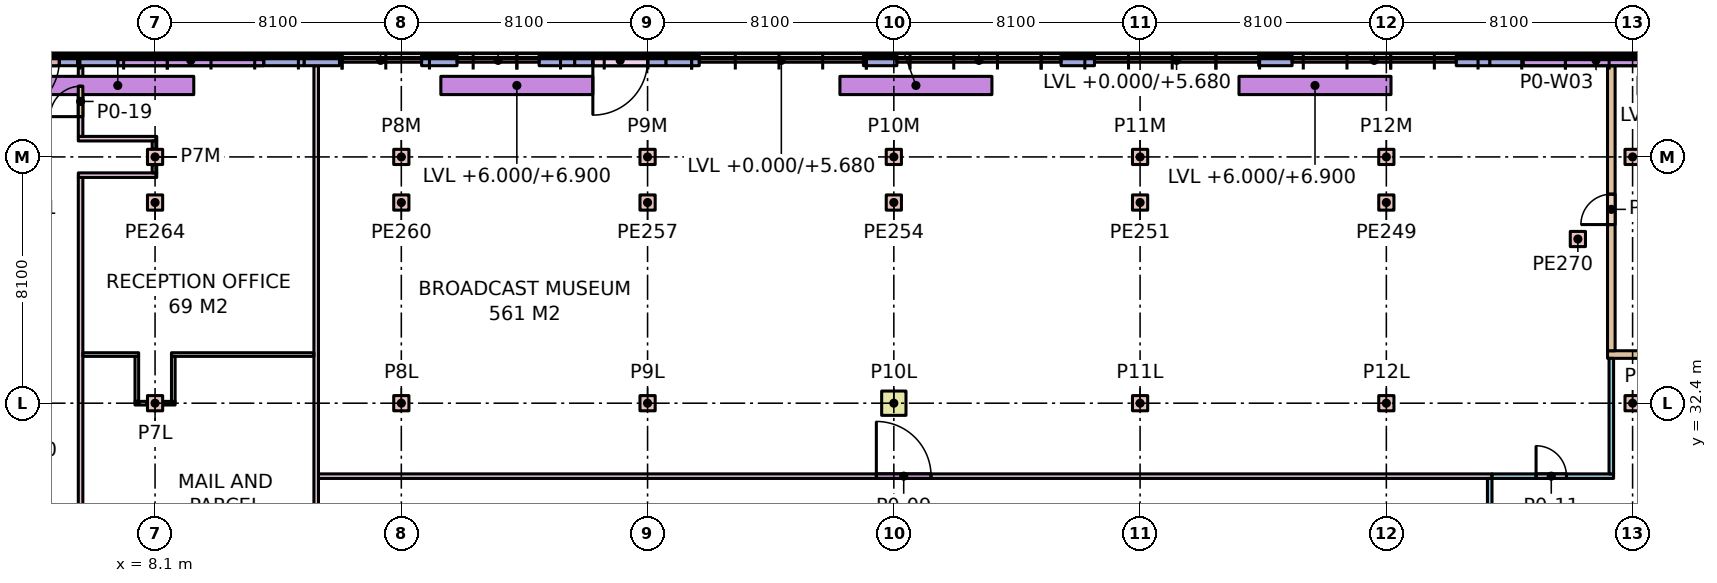
"""IFC4 building model, lengths in metres.
Left out: names, types, materials, properties, quantities, classifications, styles, units other than length and angle.
Written with IfcOpenShell. Run it as: python <this file> out.ifc"""

import sys

from ifc_helpers import new_model, si_unit, direction, frame, frame_2d, origin, origin_2d, place, context, subcontext, project, spatial, rectangle, extrude, element, fill, save


model = new_model("IFC4")
c1 = context("Model", 3, precision=1e-05, world=origin(), true_north=direction((0.0, 1.0)))
c2 = subcontext(c1, "Body", "Model", "MODEL_VIEW")
j1 = project(units=[si_unit("LENGTHUNIT", "METRE"), si_unit("PLANEANGLEUNIT", "RADIAN")], contexts=[c1])
p1 = place(None, origin())
s1 = spatial("IfcSite", under=j1, at=p1, CompositionType="ELEMENT")
p2 = place(p1, origin())
s2 = spatial("IfcBuilding", under=s1, at=p2, CompositionType="ELEMENT")
p3 = place(p2, origin())
s3 = spatial("IfcBuildingStorey", under=s2, at=p3, CompositionType="ELEMENT", Elevation=0.0)
for number, where, z_axis, x_axis in (
    (1, (8.1, 32.4, 0.0), (0.0, 0.0, 1.0), (1.0, 0.0, 0.0)),
    (2, (8.1, 40.5, 0.0), (0.0, 0.0, 1.0), (1.0, 0.0, 0.0)),
    (3, (16.2, 32.4, 0.0), (0.0, 0.0, 1.0), (1.0, 0.0, 0.0)),
    (4, (16.2, 40.5, 0.0), (0.0, 0.0, 1.0), (1.0, 0.0, 0.0)),
    (5, (24.3, 32.4, 0.0), (0.0, 0.0, 1.0), (1.0, 0.0, 0.0)),
    (6, (24.3, 40.5, 0.0), (0.0, 0.0, 1.0), (1.0, 0.0, 0.0)),
):
    element("IfcColumn", number, at=place(p3, frame(where, z_axis=z_axis, x_axis=x_axis)), inside=s3, PredefinedType="COLUMN", context=c2, shape_type="SweptSolid", body=[
        extrude(rectangle(XDim=0.5, YDim=0.5, at=origin_2d()), origin(), (0.0, 0.0, 1.0), 6.0),
    ])
p4 = place(p3, frame((32.4, 32.4, 0.0), z_axis=(0.0, 0.0, 1.0), x_axis=(1.0, 0.0, 0.0)))
e7 = element("IfcColumn", 7, at=p4, inside=s3, PredefinedType="COLUMN", context=c2, shape_type="SweptSolid", body=[
    extrude(rectangle(XDim=0.8, YDim=0.8, at=origin_2d()), origin(), (0.0, 0.0, 1.0), 6.0),
])
for number, where, z_axis, x_axis in (
    (8, (32.4, 40.5, 0.0), (0.0, 0.0, 1.0), (1.0, 0.0, 0.0)),
    (9, (40.5, 32.4, 0.0), (0.0, 0.0, 1.0), (1.0, 0.0, 0.0)),
    (10, (40.5, 40.5, 0.0), (0.0, 0.0, 1.0), (1.0, 0.0, 0.0)),
    (11, (48.6, 32.4, 0.0), (0.0, 0.0, 1.0), (1.0, 0.0, 0.0)),
    (12, (48.6, 40.5, 0.0), (0.0, 0.0, 1.0), (1.0, 0.0, 0.0)),
    (13, (56.7, 32.4, 0.0), (0.0, 0.0, 1.0), (1.0, 0.0, 0.0)),
    (14, (56.7, 40.5, 0.0), (0.0, 0.0, 1.0), (1.0, 0.0, 0.0)),
    (15, (48.6, 39.0, 0.0), (0.0, 0.0, 1.0), (1.0, 0.0, 0.0)),
    (16, (40.5, 39.0, 0.0), (0.0, 0.0, 1.0), (1.0, 0.0, 0.0)),
    (17, (32.4, 39.0, 0.0), (0.0, 0.0, 1.0), (1.0, 0.0, 0.0)),
    (18, (24.3, 39.0, 0.0), (0.0, 0.0, 1.0), (1.0, 0.0, 0.0)),
    (19, (16.2, 39.0, 0.0), (0.0, 0.0, 1.0), (1.0, 0.0, 0.0)),
    (20, (8.1, 39.0, 0.0), (0.0, 0.0, 1.0), (1.0, 0.0, 0.0)),
    (21, (54.9, 37.8, 0.0), (0.0, 0.0, 1.0), (1.0, 0.0, 0.0)),
):
    element("IfcColumn", number, at=place(p3, frame(where, z_axis=z_axis, x_axis=x_axis)), inside=s3, PredefinedType="COLUMN", context=c2, shape_type="SweptSolid", body=[
        extrude(rectangle(XDim=0.5, YDim=0.5, at=origin_2d()), origin(), (0.0, 0.0, 1.0), 6.0),
    ])
p5 = place(p3, frame((58.992, 43.675, 0.0), z_axis=(0.0, 0.0, 1.0), x_axis=(-1.0, 0.0, 0.0)))
e22 = element("IfcWall", 22, at=p5, inside=s3, PredefinedType="STANDARD", context=c2, shape_type="SweptSolid", body=[
    extrude(rectangle(XDim=6.992, YDim=0.35, at=frame_2d((3.496, 0.0))), origin(), (0.0, 0.0, 1.0), 5.68),
])
p6 = place(p5, frame((1.096, 0.0, 0.3)))
e23 = element("IfcOpeningElement", 23, at=p6, cuts=e22, PredefinedType="OPENING", context=c2, shape_type="SweptSolid", body=[
    extrude(rectangle(XDim=4.8, YDim=4.5, at=frame_2d((2.4, 2.25))), frame((0.0, 0.185, 0.0), z_axis=(0.0, -1.0, 0.0), x_axis=(1.0, 0.0, 0.0)), (0.0, 0.0, 1.0), 0.37),
])
for number, where, z_axis, x_axis in (
    (24, (52.0, 43.675, 0.0), (0.0, 0.0, 1.0), (-1.0, 0.0, 0.0)),
    (25, (45.5, 43.675, 0.0), (0.0, 0.0, 1.0), (-1.0, 0.0, 0.0)),
    (26, (39.0, 43.675, 0.0), (0.0, 0.0, 1.0), (-1.0, 0.0, 0.0)),
    (27, (32.5, 43.675, 0.0), (0.0, 0.0, 1.0), (-1.0, 0.0, 0.0)),
    (28, (26.0, 43.675, 0.0), (0.0, 0.0, 1.0), (-1.0, 0.0, 0.0)),
):
    element("IfcWall", number, at=place(p3, frame(where, z_axis=z_axis, x_axis=x_axis)), inside=s3, PredefinedType="STANDARD", context=c2, shape_type="SweptSolid", body=[
        extrude(rectangle(XDim=1.1, YDim=0.35, at=frame_2d((0.55, 0.0))), origin(), (0.0, 0.0, 1.0), 5.68),
    ])
p7 = place(p3, frame((24.9, 43.675, 0.0), z_axis=(0.0, 0.0, 1.0), x_axis=(-1.0, 0.0, 0.0)))
e29 = element("IfcWall", 29, at=p7, inside=s3, PredefinedType="STANDARD", context=c2, shape_type="SweptSolid", body=[
    extrude(rectangle(XDim=3.0, YDim=0.35, at=frame_2d((1.5, 0.0))), origin(), (0.0, 0.0, 1.0), 5.68),
])
p8 = place(p7, frame((0.6, 0.0, 0.0)))
e30 = element("IfcOpeningElement", 30, at=p8, cuts=e29, PredefinedType="OPENING", context=c2, shape_type="SweptSolid", body=[
    extrude(rectangle(XDim=1.8, YDim=2.7, at=frame_2d((0.9, 1.35))), frame((0.0, 0.185, 0.0), z_axis=(0.0, -1.0, 0.0), x_axis=(1.0, 0.0, 0.0)), (0.0, 0.0, 1.0), 0.37),
])
for number, where, z_axis, x_axis in (
    (31, (21.9, 43.675, 0.0), (0.0, 0.0, 1.0), (-1.0, 0.0, 0.0)),
    (32, (18.033, 43.675, 0.0), (0.0, 0.0, 1.0), (-1.0, 0.0, 0.0)),
):
    element("IfcWall", number, at=place(p3, frame(where, z_axis=z_axis, x_axis=x_axis)), inside=s3, PredefinedType="STANDARD", context=c2, shape_type="SweptSolid", body=[
        extrude(rectangle(XDim=1.167, YDim=0.35, at=frame_2d((0.583, 0.0))), origin(), (0.0, 0.0, 1.0), 5.68),
    ])
p9 = place(p3, frame((14.167, 43.675, 0.0), z_axis=(0.0, 0.0, 1.0), x_axis=(-1.0, 0.0, 0.0)))
e33 = element("IfcWall", 33, at=p9, inside=s3, PredefinedType="STANDARD", context=c2, shape_type="SweptSolid", body=[
    extrude(rectangle(XDim=1.167, YDim=0.35, at=frame_2d((0.583, 0.0))), origin(), (0.0, 0.0, 1.0), 5.68),
])
p10 = place(p3, frame((13.0, 43.675, 0.0), z_axis=(0.0, 0.0, 1.0), x_axis=(-1.0, 0.0, 0.0)))
e34 = element("IfcWall", 34, at=p10, inside=s3, PredefinedType="STANDARD", context=c2, shape_type="SweptSolid", body=[
    extrude(rectangle(XDim=7.45, YDim=0.35, at=frame_2d((3.725, 0.0))), origin(), (0.0, 0.0, 1.0), 5.68),
])
p11 = place(p10, frame((1.325, 0.0, 0.3)))
e35 = element("IfcOpeningElement", 35, at=p11, cuts=e34, PredefinedType="OPENING", context=c2, shape_type="SweptSolid", body=[
    extrude(rectangle(XDim=4.8, YDim=4.5, at=frame_2d((2.4, 2.25))), frame((0.0, 0.185, 0.0), z_axis=(0.0, -1.0, 0.0), x_axis=(1.0, 0.0, 0.0)), (0.0, 0.0, 1.0), 0.37),
])
p12 = place(p3, frame((5.55, 43.675, 0.0), z_axis=(0.0, 0.0, 1.0), x_axis=(-1.0, 0.0, 0.0)))
e36 = element("IfcWall", 36, at=p12, inside=s3, PredefinedType="STANDARD", context=c2, shape_type="SweptSolid", body=[
    extrude(rectangle(XDim=3.0, YDim=0.35, at=frame_2d((1.5, 0.0))), origin(), (0.0, 0.0, 1.0), 5.68),
])
p13 = place(p12, frame((0.6, 0.0, 0.0)))
e37 = element("IfcOpeningElement", 37, at=p13, cuts=e36, PredefinedType="OPENING", context=c2, shape_type="SweptSolid", body=[
    extrude(rectangle(XDim=1.8, YDim=2.4, at=frame_2d((0.9, 1.2))), frame((0.0, 0.185, 0.0), z_axis=(0.0, -1.0, 0.0), x_axis=(1.0, 0.0, 0.0)), (0.0, 0.0, 1.0), 0.37),
])
for number, where, z_axis, x_axis in (
    (38, (48.753, 42.85, 6.0), (0.0, 0.0, 1.0), (-1.0, 0.0, 0.0)),
    (39, (35.627, 42.85, 6.0), (0.0, 0.0, 1.0), (-1.0, 0.0, 0.0)),
    (40, (22.5, 42.85, 6.0), (0.0, 0.0, 1.0), (-1.0, 0.0, 0.0)),
    (41, (9.373, 42.85, 6.0), (0.0, 0.0, 1.0), (-1.0, 0.0, 0.0)),
):
    element("IfcWall", number, at=place(p3, frame(where, z_axis=z_axis, x_axis=x_axis)), inside=s3, PredefinedType="PARAPET", context=c2, shape_type="SweptSolid", body=[
        extrude(rectangle(XDim=5.0, YDim=0.6, at=frame_2d((2.5, 0.0))), origin(), (0.0, 0.0, 1.0), 0.9),
    ])
p14 = place(p3, frame((55.875, 34.0, 0.0), z_axis=(0.0, 0.0, 1.0), x_axis=(1.0, 0.0, 0.0)))
e42 = element("IfcWall", 42, at=p14, inside=s3, PredefinedType="PARTITIONING", context=c2, shape_type="SweptSolid", body=[
    extrude(rectangle(XDim=18.15, YDim=0.25, at=frame_2d((9.075, 0.0))), origin(), (0.0, 0.0, 1.0), 5.68),
])
p15 = place(p3, frame((52.0, 24.075, 0.0), z_axis=(0.0, 0.0, 1.0), x_axis=(0.0, 1.0, 0.0)))
e43 = element("IfcWall", 43, at=p15, inside=s3, PredefinedType="PARTITIONING", context=c2, shape_type="SweptSolid", body=[
    extrude(rectangle(XDim=5.85, YDim=0.15, at=frame_2d((2.925, 0.0))), origin(), (0.0, 0.0, 1.0), 5.68),
])
p16 = place(p3, frame((52.075, 30.0, 0.0), z_axis=(0.0, 0.0, 1.0), x_axis=(1.0, 0.0, 0.0)))
e44 = element("IfcWall", 44, at=p16, inside=s3, PredefinedType="PARTITIONING", context=c2, shape_type="SweptSolid", body=[
    extrude(rectangle(XDim=4.0, YDim=0.15, at=frame_2d((2.0, 0.0))), origin(), (0.0, 0.0, 1.0), 5.68),
])
p17 = place(p16, frame((1.45, 0.0, 0.0)))
e45 = element("IfcOpeningElement", 45, at=p17, cuts=e44, PredefinedType="OPENING", context=c2, shape_type="SweptSolid", body=[
    extrude(rectangle(XDim=1.0, YDim=2.1, at=frame_2d((0.5, 1.05))), frame((0.0, 0.085, 0.0), z_axis=(0.0, -1.0, 0.0), x_axis=(1.0, 0.0, 0.0)), (0.0, 0.0, 1.0), 0.17),
])
p18 = place(p3, frame((56.0, 30.075, 0.0), z_axis=(0.0, 0.0, 1.0), x_axis=(0.0, 1.0, 0.0)))
e46 = element("IfcWall", 46, at=p18, inside=s3, PredefinedType="PARTITIONING", context=c2, shape_type="SweptSolid", body=[
    extrude(rectangle(XDim=3.8, YDim=0.15, at=frame_2d((1.9, 0.0))), origin(), (0.0, 0.0, 1.0), 5.68),
])
p19 = place(p3, frame((56.0, 34.125, 0.0), z_axis=(0.0, 0.0, 1.0), x_axis=(0.0, 1.0, 0.0)))
e47 = element("IfcWall", 47, at=p19, inside=s3, PredefinedType="PARTITIONING", context=c2, shape_type="SweptSolid", body=[
    extrude(rectangle(XDim=9.375, YDim=0.25, at=frame_2d((4.688, 0.0))), origin(), (0.0, 0.0, 1.0), 5.68),
])
p20 = place(p19, frame((4.15, 0.0, 0.0)))
e48 = element("IfcOpeningElement", 48, at=p20, cuts=e47, PredefinedType="OPENING", context=c2, shape_type="SweptSolid", body=[
    extrude(rectangle(XDim=1.0, YDim=2.1, at=frame_2d((0.5, 1.05))), frame((0.0, 0.135, 0.0), z_axis=(0.0, -1.0, 0.0), x_axis=(1.0, 0.0, 0.0)), (0.0, 0.0, 1.0), 0.27),
])
p21 = place(p3, frame((13.475, 30.0, 0.0), z_axis=(0.0, 0.0, 1.0), x_axis=(1.0, 0.0, 0.0)))
e49 = element("IfcWall", 49, at=p21, inside=s3, PredefinedType="PARTITIONING", context=c2, shape_type="SweptSolid", body=[
    extrude(rectangle(XDim=38.6, YDim=0.15, at=frame_2d((19.3, 0.0))), origin(), (0.0, 0.0, 1.0), 5.68),
])
p22 = place(p21, frame((18.35, 0.0, 0.0)))
e50 = element("IfcOpeningElement", 50, at=p22, cuts=e49, PredefinedType="OPENING", context=c2, shape_type="SweptSolid", body=[
    extrude(rectangle(XDim=1.8, YDim=2.4, at=frame_2d((0.9, 1.2))), frame((0.0, 0.085, 0.0), z_axis=(0.0, -1.0, 0.0), x_axis=(1.0, 0.0, 0.0)), (0.0, 0.0, 1.0), 0.17),
])
p23 = place(p3, frame((13.4, 11.475, 0.0), z_axis=(0.0, 0.0, 1.0), x_axis=(0.0, 1.0, 0.0)))
e51 = element("IfcWall", 51, at=p23, inside=s3, PredefinedType="PARTITIONING", context=c2, shape_type="SweptSolid", body=[
    extrude(rectangle(XDim=32.025, YDim=0.15, at=frame_2d((16.012, 0.0))), origin(), (0.0, 0.0, 1.0), 5.68),
])
p24 = place(p3, frame((7.44, 32.4, 0.0), z_axis=(0.0, 0.0, 1.0), x_axis=(1.0, 0.0, 0.0)))
e52 = element("IfcWall", 52, at=p24, inside=s3, PredefinedType="PARTITIONING", context=c2, shape_type="SweptSolid", body=[
    extrude(rectangle(XDim=0.4, YDim=0.12, at=frame_2d((0.2, 0.0))), origin(), (0.0, 0.0, 1.0), 5.68),
])
p25 = place(p3, frame((8.36, 32.4, 0.0), z_axis=(0.0, 0.0, 1.0), x_axis=(1.0, 0.0, 0.0)))
e53 = element("IfcWall", 53, at=p25, inside=s3, PredefinedType="PARTITIONING", context=c2, shape_type="SweptSolid", body=[
    extrude(rectangle(XDim=0.4, YDim=0.12, at=frame_2d((0.2, 0.0))), origin(), (0.0, 0.0, 1.0), 5.68),
])
p26 = place(p3, frame((5.725, 34.0, 0.0), z_axis=(0.0, 0.0, 1.0), x_axis=(1.0, 0.0, 0.0)))
e54 = element("IfcWall", 54, at=p26, inside=s3, PredefinedType="PARTITIONING", context=c2, shape_type="SweptSolid", body=[
    extrude(rectangle(XDim=1.835, YDim=0.12, at=frame_2d((0.917, 0.0))), origin(), (0.0, 0.0, 1.0), 5.68),
])
p27 = place(p3, frame((8.64, 34.0, 0.0), z_axis=(0.0, 0.0, 1.0), x_axis=(1.0, 0.0, 0.0)))
e55 = element("IfcWall", 55, at=p27, inside=s3, PredefinedType="PARTITIONING", context=c2, shape_type="SweptSolid", body=[
    extrude(rectangle(XDim=4.685, YDim=0.12, at=frame_2d((2.343, 0.0))), origin(), (0.0, 0.0, 1.0), 5.68),
])
for number, where, z_axis, x_axis in (
    (56, (7.5, 32.46, 0.0), (0.0, 0.0, 1.0), (0.0, 1.0, 0.0)),
    (57, (8.7, 32.46, 0.0), (0.0, 0.0, 1.0), (0.0, 1.0, 0.0)),
):
    element("IfcWall", number, at=place(p3, frame(where, z_axis=z_axis, x_axis=x_axis)), inside=s3, PredefinedType="PARTITIONING", context=c2, shape_type="SweptSolid", body=[
        extrude(rectangle(XDim=1.48, YDim=0.12, at=frame_2d((0.74, 0.0))), origin(), (0.0, 0.0, 1.0), 5.68),
    ])
for number, where, z_axis, x_axis in (
    (58, (5.575, 39.9, 0.0), (0.0, 0.0, 1.0), (1.0, 0.0, 0.0)),
    (59, (5.575, 41.1, 0.0), (0.0, 0.0, 1.0), (1.0, 0.0, 0.0)),
):
    element("IfcWall", number, at=place(p3, frame(where, z_axis=z_axis, x_axis=x_axis)), inside=s3, PredefinedType="PARTITIONING", context=c2, shape_type="SweptSolid", body=[
        extrude(rectangle(XDim=2.58, YDim=0.15, at=frame_2d((1.29, 0.0))), origin(), (0.0, 0.0, 1.0), 5.68),
    ])
p28 = place(p3, frame((5.65, 41.175, 0.0), z_axis=(0.0, 0.0, 1.0), x_axis=(0.0, 1.0, 0.0)))
e60 = element("IfcWall", 60, at=p28, inside=s3, PredefinedType="PARTITIONING", context=c2, shape_type="SweptSolid", body=[
    extrude(rectangle(XDim=2.325, YDim=0.15, at=frame_2d((1.163, 0.0))), origin(), (0.0, 0.0, 1.0), 5.68),
])
p29 = place(p28, frame((0.65, 0.0, 0.0)))
e61 = element("IfcOpeningElement", 61, at=p29, cuts=e60, PredefinedType="OPENING", context=c2, shape_type="SweptSolid", body=[
    extrude(rectangle(XDim=1.0, YDim=2.1, at=frame_2d((0.5, 1.05))), frame((0.0, 0.085, 0.0), z_axis=(0.0, -1.0, 0.0), x_axis=(1.0, 0.0, 0.0)), (0.0, 0.0, 1.0), 0.17),
])
for number, where, z_axis, x_axis in (
    (62, (8.08, 39.975, 0.0), (0.0, 0.0, 1.0), (0.0, 1.0, 0.0)),
    (63, (8.08, 40.76, 0.0), (0.0, 0.0, 1.0), (0.0, 1.0, 0.0)),
):
    element("IfcWall", number, at=place(p3, frame(where, z_axis=z_axis, x_axis=x_axis)), inside=s3, PredefinedType="PARTITIONING", context=c2, shape_type="SweptSolid", body=[
        extrude(rectangle(XDim=0.265, YDim=0.15, at=frame_2d((0.132, 0.0))), origin(), (0.0, 0.0, 1.0), 5.68),
    ])
p30 = place(p3, frame((5.65, 21.125, 0.0), z_axis=(0.0, 0.0, 1.0), x_axis=(0.0, 1.0, 0.0)))
e64 = element("IfcWall", 64, at=p30, inside=s3, PredefinedType="PARTITIONING", context=c2, shape_type="SweptSolid", body=[
    extrude(rectangle(XDim=18.7, YDim=0.15, at=frame_2d((9.35, 0.0))), origin(), (0.0, 0.0, 1.0), 5.68),
])
p31 = place(p30, frame((6.325, 0.0, 0.0)))
e65 = element("IfcOpeningElement", 65, at=p31, cuts=e64, PredefinedType="OPENING", context=c2, shape_type="SweptSolid", body=[
    extrude(rectangle(XDim=1.0, YDim=2.1, at=frame_2d((0.5, 1.05))), frame((0.0, 0.085, 0.0), z_axis=(0.0, -1.0, 0.0), x_axis=(1.0, 0.0, 0.0)), (0.0, 0.0, 1.0), 0.17),
])
p32 = place(p6, origin())
e66 = element("IfcWindow", 66, at=p32, inside=s3, PartitioningType="SINGLE_PANEL", PredefinedType="WINDOW", context=c2, shape_type="SweptSolid", body=[
    extrude(rectangle(XDim=4.8, YDim=4.5, at=frame_2d((2.4, 2.25))), frame((0.0, 0.03, 0.0), z_axis=(0.0, -1.0, 0.0), x_axis=(1.0, 0.0, 0.0)), (0.0, 0.0, 1.0), 0.06),
])
fill(e23, e66)
p33 = place(p11, origin())
e67 = element("IfcWindow", 67, at=p33, inside=s3, PartitioningType="SINGLE_PANEL", PredefinedType="WINDOW", context=c2, shape_type="SweptSolid", body=[
    extrude(rectangle(XDim=4.8, YDim=4.5, at=frame_2d((2.4, 2.25))), frame((0.0, 0.03, 0.0), z_axis=(0.0, -1.0, 0.0), x_axis=(1.0, 0.0, 0.0)), (0.0, 0.0, 1.0), 0.06),
])
fill(e35, e67)
p34 = place(p22, origin())
e68 = element("IfcDoor", 68, at=p34, inside=s3, OperationType="SINGLE_SWING_LEFT", PredefinedType="DOOR", context=c2, shape_type="SweptSolid", body=[
    extrude(rectangle(XDim=1.8, YDim=2.4, at=frame_2d((0.9, 1.2))), frame((0.0, 0.025, 0.0), z_axis=(0.0, -1.0, 0.0), x_axis=(1.0, 0.0, 0.0)), (0.0, 0.0, 1.0), 0.05),
])
fill(e50, e68)
p35 = place(p17, origin())
e69 = element("IfcDoor", 69, at=p35, inside=s3, OperationType="SINGLE_SWING_LEFT", PredefinedType="DOOR", context=c2, shape_type="SweptSolid", body=[
    extrude(rectangle(XDim=1.0, YDim=2.1, at=frame_2d((0.5, 1.05))), frame((0.0, 0.025, 0.0), z_axis=(0.0, -1.0, 0.0), x_axis=(1.0, 0.0, 0.0)), (0.0, 0.0, 1.0), 0.05),
])
fill(e45, e69)
p36 = place(p20, origin())
e70 = element("IfcDoor", 70, at=p36, inside=s3, OperationType="SINGLE_SWING_LEFT", PredefinedType="DOOR", context=c2, shape_type="SweptSolid", body=[
    extrude(rectangle(XDim=1.0, YDim=2.1, at=frame_2d((0.5, 1.05))), frame((0.0, 0.025, 0.0), z_axis=(0.0, -1.0, 0.0), x_axis=(1.0, 0.0, 0.0)), (0.0, 0.0, 1.0), 0.05),
])
fill(e48, e70)
p37 = place(p29, origin())
e71 = element("IfcDoor", 71, at=p37, inside=s3, OperationType="SINGLE_SWING_LEFT", PredefinedType="DOOR", context=c2, shape_type="SweptSolid", body=[
    extrude(rectangle(XDim=1.0, YDim=2.1, at=frame_2d((0.5, 1.05))), frame((0.0, 0.025, 0.0), z_axis=(0.0, -1.0, 0.0), x_axis=(1.0, 0.0, 0.0)), (0.0, 0.0, 1.0), 0.05),
])
fill(e61, e71)
p38 = place(p8, frame((1.8, 0.0, 0.0), z_axis=(0.0, 0.0, 1.0), x_axis=(-1.0, 0.0, 0.0)))
e72 = element("IfcDoor", 72, at=p38, inside=s3, OperationType="SINGLE_SWING_RIGHT", PredefinedType="DOOR", context=c2, shape_type="SweptSolid", body=[
    extrude(rectangle(XDim=1.8, YDim=2.7, at=frame_2d((0.9, 1.35))), frame((0.0, 0.025, 0.0), z_axis=(0.0, -1.0, 0.0), x_axis=(1.0, 0.0, 0.0)), (0.0, 0.0, 1.0), 0.05),
])
fill(e30, e72)
p39 = place(p13, frame((1.8, 0.0, 0.0), z_axis=(0.0, 0.0, 1.0), x_axis=(-1.0, 0.0, 0.0)))
e73 = element("IfcDoor", 73, at=p39, inside=s3, OperationType="SINGLE_SWING_RIGHT", PredefinedType="DOOR", context=c2, shape_type="SweptSolid", body=[
    extrude(rectangle(XDim=1.8, YDim=2.4, at=frame_2d((0.9, 1.2))), frame((0.0, 0.025, 0.0), z_axis=(0.0, -1.0, 0.0), x_axis=(1.0, 0.0, 0.0)), (0.0, 0.0, 1.0), 0.05),
])
fill(e37, e73)
save(model, sys.argv[1])
